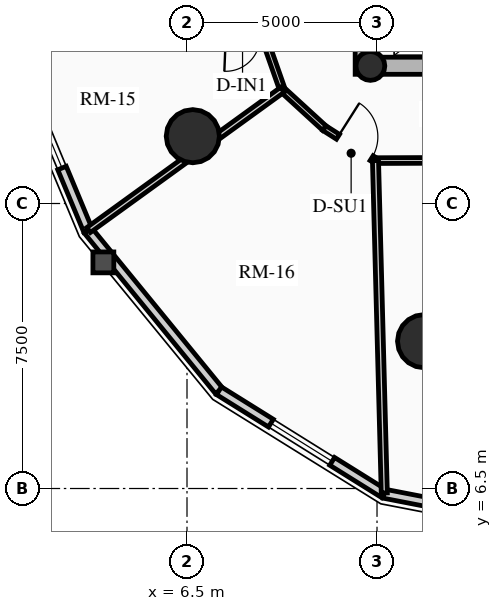
"""IFC4 building model, lengths in metres.
Left out: names, types, materials, properties, quantities, classifications, styles, units other than length and angle.
Written with IfcOpenShell. Run it as: python <this file> out.ifc"""

import sys

from ifc_helpers import new_model, si_unit, direction, frame, frame_2d, origin, origin_2d, place, context, subcontext, project, spatial, rectangle, circle, hollow_circle, extrude, source, transform, mapped, element, fill, save


model = new_model("IFC4")
c1 = context("Model", 3, precision=1e-05, world=origin(), true_north=direction((0.0, 1.0)))
c2 = subcontext(c1, "Body", "Model", "MODEL_VIEW")
j1 = project(units=[si_unit("LENGTHUNIT", "METRE"), si_unit("PLANEANGLEUNIT", "RADIAN")], contexts=[c1])
p1 = place(None, origin())
s1 = spatial("IfcSite", under=j1, at=p1, CompositionType="ELEMENT")
p2 = place(p1, origin())
s2 = spatial("IfcBuilding", under=s1, at=p2, CompositionType="ELEMENT")
p3 = place(p2, frame((0.0, 0.0, 81.79)))
s3 = spatial("IfcBuildingStorey", under=s2, at=p3, CompositionType="ELEMENT", Elevation=81.79)
p4 = place(p3, frame((11.15, 17.4, 0.0), z_axis=(0.0, 0.0, 1.0), x_axis=(0.0, 1.0, 0.0)))
e1 = element("IfcWall", 1, at=p4, inside=s3, PredefinedType="SHEAR", context=c2, shape_type="SweptSolid", body=[
    extrude(rectangle(XDim=14.2, YDim=0.45, at=frame_2d((7.1, 0.0))), origin(), (0.0, 0.0, 1.0), 2.91),
])
p5 = place(p3, frame((11.15, 17.625, 0.0), z_axis=(0.0, 0.0, 1.0), x_axis=(1.0, 0.0, 0.0)))
e2 = element("IfcWall", 2, at=p5, inside=s3, PredefinedType="SHEAR", context=c2, shape_type="SweptSolid", body=[
    extrude(rectangle(XDim=10.7, YDim=0.45, at=frame_2d((5.35, 0.0))), origin(), (0.0, 0.0, 1.0), 2.91),
])
m1 = source(origin(), c2, "Body", "SweptSolid", [
    extrude(rectangle(XDim=1.5, YDim=2.02, at=frame_2d((0.75, 1.01))), frame((0.0, 0.235, 0.0), z_axis=(0.0, -1.0, 0.0), x_axis=(1.0, 0.0, 0.0)), (0.0, 0.0, 1.0), 0.47),
])
p6 = place(p5, frame((5.45, 0.0, 0.0)))
e3 = element("IfcOpeningElement", 3, at=p6, cuts=e2, PredefinedType="OPENING", context=c2, shape_type="MappedRepresentation", body=[
    mapped(m1, transform((0.0, 0.0, 0.0), x_axis=(1.0, 0.0, 0.0), y_axis=(0.0, 1.0, 0.0), z_axis=(0.0, 0.0, 1.0), scale=1.0)),
])
p7 = place(p3, frame((11.325, 17.62, 0.0), z_axis=(0.0, 0.0, 1.0), x_axis=(1.0, 0.0, 0.0)))
e4 = element("IfcColumn", 4, at=p7, inside=s3, PredefinedType="COLUMN", context=c2, shape_type="SweptSolid", body=[
    extrude(hollow_circle(Radius=0.38, WallThickness=0.032, at=origin_2d()), origin(), (0.0, 0.0, 1.0), 2.91),
])
for number, where, z_axis, x_axis in (
    (5, (6.653, 15.771, 0.0), (0.0, 0.0, 1.0), (1.0, 0.0, 0.0)),
    (6, (12.739, 10.377, 0.0), (0.0, 0.0, 1.0), (1.0, 0.0, 0.0)),
):
    element("IfcColumn", number, at=place(p3, frame(where, z_axis=z_axis, x_axis=x_axis)), inside=s3, PredefinedType="USERDEFINED", context=c2, shape_type="SweptSolid", body=[
        extrude(circle(Radius=0.7, at=origin_2d()), origin(), (0.0, 0.0, 1.0), 2.91),
    ])
p8 = place(p3, frame((3.895, 13.291, 0.0), z_axis=(0.0, 0.0, 1.0), x_axis=(-0.384344417632, 0.923189779317, 0.0)))
e7 = element("IfcWall", 7, at=p8, inside=s3, PredefinedType="SOLIDWALL", context=c2, shape_type="SweptSolid", body=[
    extrude(rectangle(XDim=5.758, YDim=0.24, at=frame_2d((2.879, 0.0))), origin(), (0.0, 0.0, 1.0), 2.179),
])
m2 = source(origin(), c2, "Body", "SweptSolid", [
    extrude(rectangle(XDim=2.2, YDim=1.35, at=frame_2d((1.1, 0.675))), frame((0.0, 0.13, 0.0), z_axis=(0.0, -1.0, 0.0), x_axis=(1.0, 0.0, 0.0)), (0.0, 0.0, 1.0), 0.26),
])
p9 = place(p8, frame((1.779, 0.0, 0.65)))
e8 = element("IfcOpeningElement", 8, at=p9, cuts=e7, PredefinedType="OPENING", context=c2, shape_type="MappedRepresentation", body=[
    mapped(m2, transform((0.0, 0.0, 0.0), x_axis=(1.0, 0.0, 0.0), y_axis=(0.0, 1.0, 0.0), z_axis=(0.0, 0.0, 1.0), scale=1.0)),
])
p10 = place(p3, frame((7.342, 9.072, 0.0), z_axis=(0.0, 0.0, 1.0), x_axis=(-0.632700781152, 0.77439635945, 0.0)))
e9 = element("IfcWall", 9, at=p10, inside=s3, PredefinedType="SOLIDWALL", context=c2, shape_type="SweptSolid", body=[
    extrude(rectangle(XDim=5.448, YDim=0.24, at=frame_2d((2.724, 0.0))), origin(), (0.0, 0.0, 1.0), 2.179),
])
p11 = place(p3, frame((11.685, 6.363, 0.0), z_axis=(0.0, 0.0, 1.0), x_axis=(-0.848520380187, 0.529162701263, 0.0)))
e10 = element("IfcWall", 10, at=p11, inside=s3, PredefinedType="SOLIDWALL", context=c2, shape_type="SweptSolid", body=[
    extrude(rectangle(XDim=5.119, YDim=0.24, at=frame_2d((2.56, 0.0))), origin(), (0.0, 0.0, 1.0), 2.179),
])
m3 = source(origin(), c2, "Body", "SweptSolid", [
    extrude(rectangle(XDim=1.9, YDim=1.35, at=frame_2d((0.95, 0.675))), frame((0.0, 0.13, 0.0), z_axis=(0.0, -1.0, 0.0), x_axis=(1.0, 0.0, 0.0)), (0.0, 0.0, 1.0), 0.26),
])
p12 = place(p11, frame((1.609, 0.0, 0.65)))
e11 = element("IfcOpeningElement", 11, at=p12, cuts=e10, PredefinedType="OPENING", context=c2, shape_type="MappedRepresentation", body=[
    mapped(m3, transform((0.0, 0.0, 0.0), x_axis=(1.0, 0.0, 0.0), y_axis=(0.0, 1.0, 0.0), z_axis=(0.0, 0.0, 1.0), scale=1.0)),
])
p13 = place(p3, frame((16.5, 5.43, 0.0), z_axis=(0.0, 0.0, 1.0), x_axis=(-0.981723785992, 0.190311344954, 0.0)))
e12 = element("IfcWall", 12, at=p13, inside=s3, PredefinedType="SOLIDWALL", context=c2, shape_type="SweptSolid", body=[
    extrude(rectangle(XDim=4.904, YDim=0.24, at=frame_2d((2.452, 0.0))), origin(), (0.0, 0.0, 1.0), 2.179),
])
p14 = place(p13, frame((1.352, 0.0, 0.65)))
e13 = element("IfcOpeningElement", 13, at=p14, cuts=e12, PredefinedType="OPENING", context=c2, shape_type="MappedRepresentation", body=[
    mapped(m2, transform((0.0, 0.0, 0.0), x_axis=(1.0, 0.0, 0.0), y_axis=(0.0, 1.0, 0.0), z_axis=(0.0, 0.0, 1.0), scale=1.0)),
])
p15 = place(p3, frame((8.538, 18.338, 0.0), z_axis=(0.0, 0.0, 1.0), x_axis=(0.331358150167, -0.94350504838, 0.0)))
e14 = element("IfcWall", 14, at=p15, inside=s3, PredefinedType="PARTITIONING", context=c2, shape_type="SweptSolid", body=[
    extrude(rectangle(XDim=1.424, YDim=0.15, at=frame_2d((0.712, 0.0))), origin(), (0.0, 0.0, 1.0), 2.225),
])
p16 = place(p3, frame((9.01, 16.994, 0.0), z_axis=(0.0, 0.0, 1.0), x_axis=(0.737701798986, -0.67512669609, 0.0)))
e15 = element("IfcWall", 15, at=p16, inside=s3, PredefinedType="PARTITIONING", context=c2, shape_type="SweptSolid", body=[
    extrude(rectangle(XDim=1.498, YDim=0.15, at=frame_2d((0.749, 0.0))), origin(), (0.0, 0.0, 1.0), 2.225),
])
p17 = place(p3, frame((10.115, 15.983, 0.0), z_axis=(0.0, 0.0, 1.0), x_axis=(0.843995849351, -0.536349705209, 0.0)))
e16 = element("IfcWall", 16, at=p17, inside=s3, PredefinedType="PARTITIONING", context=c2, shape_type="SweptSolid", body=[
    extrude(rectangle(XDim=1.593, YDim=0.15, at=frame_2d((0.796, 0.0))), origin(), (0.0, 0.0, 1.0), 2.225),
])
m4 = source(origin(), c2, "Body", "SweptSolid", [
    extrude(rectangle(XDim=1.05, YDim=2.015, at=frame_2d((0.525, 1.007))), frame((0.0, 0.085, 0.0), z_axis=(0.0, -1.0, 0.0), x_axis=(1.0, 0.0, 0.0)), (0.0, 0.0, 1.0), 0.17),
])
p18 = place(p17, frame((0.423, 0.0, 0.0)))
e17 = element("IfcOpeningElement", 17, at=p18, cuts=e16, PredefinedType="OPENING", context=c2, shape_type="MappedRepresentation", body=[
    mapped(m4, transform((0.0, 0.0, 0.0), x_axis=(1.0, 0.0, 0.0), y_axis=(0.0, 1.0, 0.0), z_axis=(0.0, 0.0, 1.0), scale=1.0)),
])
p19 = place(p3, frame((11.46, 15.129, 0.0), z_axis=(0.0, 0.0, 1.0), x_axis=(0.999993513287, 0.003601858435, 0.0)))
e18 = element("IfcWall", 18, at=p19, inside=s3, PredefinedType="PARTITIONING", context=c2, shape_type="SweptSolid", body=[
    extrude(rectangle(XDim=3.321, YDim=0.15, at=frame_2d((1.661, 0.0))), origin(), (0.0, 0.0, 1.0), 2.225),
])
p20 = place(p3, frame((9.01, 16.994, 0.0), z_axis=(0.0, 0.0, 1.0), x_axis=(-0.81001707524, -0.586406290741, 0.0)))
e19 = element("IfcWall", 19, at=p20, inside=s3, PredefinedType="PARTITIONING", context=c2, shape_type="SweptSolid", body=[
    extrude(rectangle(XDim=6.295, YDim=0.16, at=frame_2d((3.148, 0.0))), origin(), (0.0, 0.0, 1.0), 2.179),
])
p21 = place(p3, frame((11.46, 15.129, 0.0), z_axis=(0.0, 0.0, 1.0), x_axis=(0.026480592098, -0.999649327636, 0.0)))
e20 = element("IfcWall", 20, at=p21, inside=s3, PredefinedType="PARTITIONING", context=c2, shape_type="SweptSolid", body=[
    extrude(rectangle(XDim=8.75, YDim=0.16, at=frame_2d((4.375, 0.0))), origin(), (0.0, 0.0, 1.0), 2.179),
])
m5 = source(origin(), c2, "Body", "SweptSolid", [
    extrude(rectangle(XDim=2.2, YDim=1.35, at=frame_2d((1.1, 0.675))), frame((0.0, 0.03, 0.0), z_axis=(0.0, -1.0, 0.0), x_axis=(1.0, 0.0, 0.0)), (0.0, 0.0, 1.0), 0.06),
])
p22 = place(p9, origin())
e21 = element("IfcWindow", 21, at=p22, inside=s3, PartitioningType="DOUBLE_PANEL_VERTICAL", PredefinedType="WINDOW", context=c2, shape_type="MappedRepresentation", body=[
    mapped(m5, transform((0.0, 0.0, 0.0), x_axis=(1.0, 0.0, 0.0), y_axis=(0.0, 1.0, 0.0), z_axis=(0.0, 0.0, 1.0), scale=1.0)),
])
fill(e8, e21)
m6 = source(origin(), c2, "Body", "SweptSolid", [
    extrude(rectangle(XDim=1.9, YDim=1.35, at=frame_2d((0.95, 0.675))), frame((0.0, 0.03, 0.0), z_axis=(0.0, -1.0, 0.0), x_axis=(1.0, 0.0, 0.0)), (0.0, 0.0, 1.0), 0.06),
])
p23 = place(p12, origin())
e22 = element("IfcWindow", 22, at=p23, inside=s3, PartitioningType="DOUBLE_PANEL_VERTICAL", PredefinedType="WINDOW", context=c2, shape_type="MappedRepresentation", body=[
    mapped(m6, transform((0.0, 0.0, 0.0), x_axis=(1.0, 0.0, 0.0), y_axis=(0.0, 1.0, 0.0), z_axis=(0.0, 0.0, 1.0), scale=1.0)),
])
fill(e11, e22)
m7 = source(origin(), c2, "Body", "SweptSolid", [
    extrude(rectangle(XDim=1.05, YDim=2.015, at=frame_2d((0.525, 1.007))), frame((0.0, 0.025, 0.0), z_axis=(0.0, -1.0, 0.0), x_axis=(1.0, 0.0, 0.0)), (0.0, 0.0, 1.0), 0.05),
])
p24 = place(p18, origin())
e23 = element("IfcDoor", 23, at=p24, inside=s3, OperationType="SINGLE_SWING_LEFT", PredefinedType="DOOR", context=c2, shape_type="MappedRepresentation", body=[
    mapped(m7, transform((0.0, 0.0, 0.0), x_axis=(1.0, 0.0, 0.0), y_axis=(0.0, 1.0, 0.0), z_axis=(0.0, 0.0, 1.0), scale=1.0)),
])
fill(e17, e23)
save(model, sys.argv[1])
